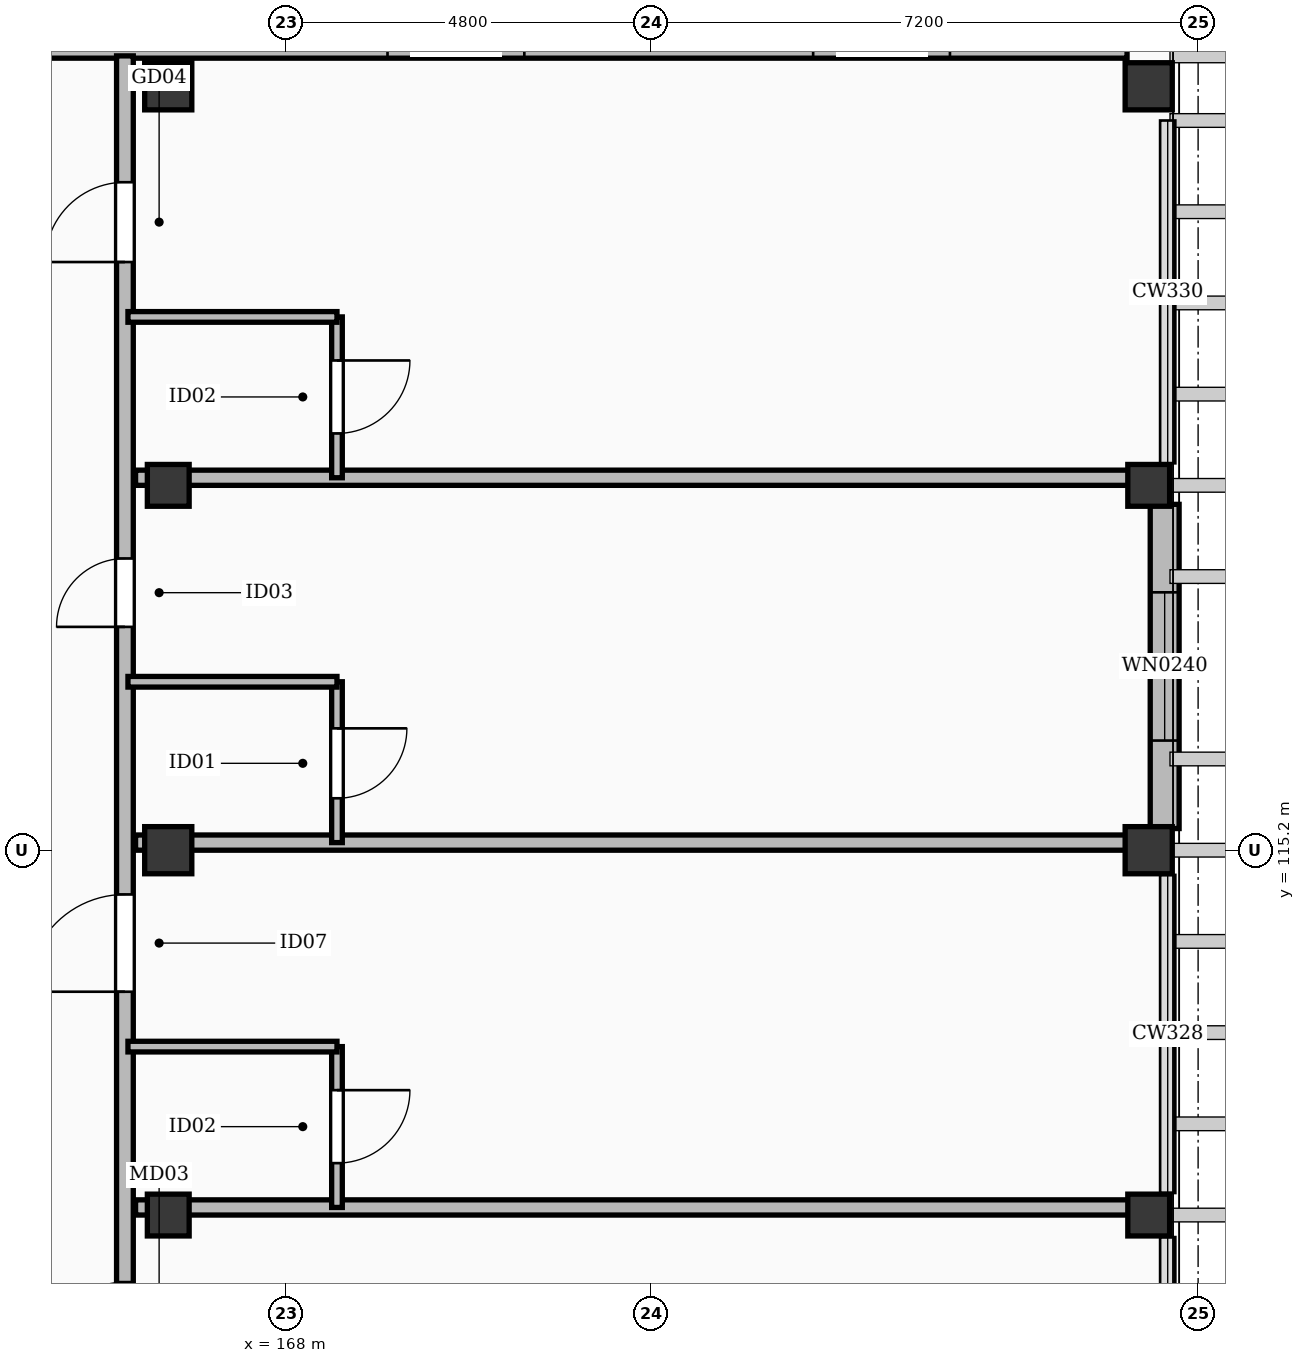
"""IFC4 building model, lengths in metres.
Left out: names, types, materials, properties, quantities, classifications, styles, units other than length and angle.
Written with IfcOpenShell. Run it as: python <this file> out.ifc"""

import sys

from ifc_helpers import new_model, si_unit, direction, frame, frame_2d, origin, origin_2d, place, context, subcontext, project, spatial, rectangle, extrude, element, fill, save


model = new_model("IFC4")
c1 = context("Model", 3, precision=1e-05, world=origin(), true_north=direction((0.0, 1.0)))
c2 = subcontext(c1, "Body", "Model", "MODEL_VIEW")
j1 = project(units=[si_unit("LENGTHUNIT", "METRE"), si_unit("PLANEANGLEUNIT", "RADIAN")], contexts=[c1])
p1 = place(None, origin())
s1 = spatial("IfcSite", under=j1, at=p1, CompositionType="ELEMENT")
p2 = place(p1, origin())
s2 = spatial("IfcBuilding", under=s1, at=p2, CompositionType="ELEMENT")
p3 = place(p2, frame((0.0, 0.0, 42.6)))
s3 = spatial("IfcBuildingStorey", under=s2, at=p3, CompositionType="ELEMENT", Elevation=42.6)
for number, where, z_axis, x_axis in (
    (1, (166.45, 115.2, 0.0), (0.0, 0.0, 1.0), (1.0, 0.0, 0.0)),
    (2, (166.45, 125.25, 0.0), (0.0, 0.0, 1.0), (1.0, 0.0, 0.0)),
    (3, (179.35, 115.2, 0.0), (0.0, 0.0, 1.0), (1.0, 0.0, 0.0)),
    (4, (179.35, 125.25, 0.0), (0.0, 0.0, 1.0), (1.0, 0.0, 0.0)),
):
    element("IfcColumn", number, at=place(p3, frame(where, z_axis=z_axis, x_axis=x_axis)), inside=s3, PredefinedType="COLUMN", context=c2, shape_type="SweptSolid", body=[
        extrude(rectangle(XDim=0.62, YDim=0.62, at=origin_2d()), origin(), (0.0, 0.0, 1.0), 3.9),
    ])
for number, where, z_axis, x_axis in (
    (5, (166.45, 110.4, 0.0), (0.0, 0.0, 1.0), (1.0, 0.0, 0.0)),
    (6, (166.45, 120.0, 0.0), (0.0, 0.0, 1.0), (1.0, 0.0, 0.0)),
    (7, (179.35, 110.4, 0.0), (0.0, 0.0, 1.0), (1.0, 0.0, 0.0)),
    (8, (179.35, 120.0, 0.0), (0.0, 0.0, 1.0), (1.0, 0.0, 0.0)),
):
    element("IfcColumn", number, at=place(p3, frame(where, z_axis=z_axis, x_axis=x_axis)), inside=s3, PredefinedType="COLUMN", context=c2, shape_type="SweptSolid", body=[
        extrude(rectangle(XDim=0.55, YDim=0.55, at=origin_2d()), origin(), (0.0, 0.0, 1.0), 3.9),
    ])
p4 = place(p3, frame((149.735, 125.81, 0.0), z_axis=(0.0, 0.0, 1.0), x_axis=(1.0, 0.0, 0.0)))
e9 = element("IfcWall", 9, at=p4, inside=s3, PredefinedType="SOLIDWALL", context=c2, shape_type="SweptSolid", body=[
    extrude(rectangle(XDim=29.33, YDim=0.38, at=frame_2d((14.665, 0.0))), origin(), (0.0, 0.0, 1.0), 3.66),
])
p5 = place(p4, frame((3.6, 0.0, 0.55)))
e10 = element("IfcOpeningElement", 10, at=p5, cuts=e9, PredefinedType="OPENING", context=c2, shape_type="SweptSolid", body=[
    extrude(rectangle(XDim=1.8, YDim=1.76, at=frame_2d((0.9, 0.88))), frame((0.0, 0.202, 0.0), z_axis=(0.0, -1.0, 0.0), x_axis=(1.0, 0.0, 0.0)), (0.0, 0.0, 1.0), 0.404),
])
p6 = place(p4, frame((9.2, 0.0, 0.55)))
e11 = element("IfcOpeningElement", 11, at=p6, cuts=e9, PredefinedType="OPENING", context=c2, shape_type="SweptSolid", body=[
    extrude(rectangle(XDim=1.8, YDim=1.76, at=frame_2d((0.9, 0.88))), frame((0.0, 0.202, 0.0), z_axis=(0.0, -1.0, 0.0), x_axis=(1.0, 0.0, 0.0)), (0.0, 0.0, 1.0), 0.404),
])
p7 = place(p4, frame((19.6, 0.0, 0.55)))
e12 = element("IfcOpeningElement", 12, at=p7, cuts=e9, PredefinedType="OPENING", context=c2, shape_type="SweptSolid", body=[
    extrude(rectangle(XDim=1.8, YDim=1.76, at=frame_2d((0.9, 0.88))), frame((0.0, 0.202, 0.0), z_axis=(0.0, -1.0, 0.0), x_axis=(1.0, 0.0, 0.0)), (0.0, 0.0, 1.0), 0.404),
])
p8 = place(p4, frame((25.2, 0.0, 0.55)))
e13 = element("IfcOpeningElement", 13, at=p8, cuts=e9, PredefinedType="OPENING", context=c2, shape_type="SweptSolid", body=[
    extrude(rectangle(XDim=1.8, YDim=1.76, at=frame_2d((0.9, 0.88))), frame((0.0, 0.202, 0.0), z_axis=(0.0, -1.0, 0.0), x_axis=(1.0, 0.0, 0.0)), (0.0, 0.0, 1.0), 0.404),
])
p9 = place(p3, frame((179.56, 119.75, 0.0), z_axis=(0.0, 0.0, 1.0), x_axis=(0.0, -1.0, 0.0)))
e14 = element("IfcWall", 14, at=p9, inside=s3, PredefinedType="SOLIDWALL", context=c2, shape_type="SweptSolid", body=[
    extrude(rectangle(XDim=4.265, YDim=0.38, at=frame_2d((2.132, 0.0))), origin(), (0.0, 0.0, 1.0), 2.902),
])
p10 = place(p9, frame((1.157, 0.0, 0.55)))
e15 = element("IfcOpeningElement", 15, at=p10, cuts=e14, PredefinedType="OPENING", context=c2, shape_type="SweptSolid", body=[
    extrude(rectangle(XDim=1.95, YDim=1.77, at=frame_2d((0.975, 0.885))), frame((0.0, 0.202, 0.0), z_axis=(0.0, -1.0, 0.0), x_axis=(1.0, 0.0, 0.0)), (0.0, 0.0, 1.0), 0.404),
])
p11 = place(p3, frame((165.88, 62.75, 0.0), z_axis=(0.0, 0.0, 1.0), x_axis=(0.0, 1.0, 0.0)))
e16 = element("IfcWall", 16, at=p11, inside=s3, PredefinedType="PARTITIONING", context=c2, shape_type="SweptSolid", body=[
    extrude(rectangle(XDim=62.9, YDim=0.22, at=frame_2d((31.45, 0.0))), origin(), (0.0, 0.0, 1.0), 2.902),
])
p12 = place(p11, frame((0.691, 0.0, 0.0)))
e17 = element("IfcOpeningElement", 17, at=p12, cuts=e16, PredefinedType="OPENING", context=c2, shape_type="SweptSolid", body=[
    extrude(rectangle(XDim=1.05, YDim=2.22, at=frame_2d((0.525, 1.11))), frame((0.0, 0.122, 0.0), z_axis=(0.0, -1.0, 0.0), x_axis=(1.0, 0.0, 0.0)), (0.0, 0.0, 1.0), 0.244),
])
p13 = place(p11, frame((7.388, 0.0, 0.0)))
e18 = element("IfcOpeningElement", 18, at=p13, cuts=e16, PredefinedType="OPENING", context=c2, shape_type="SweptSolid", body=[
    extrude(rectangle(XDim=1.02, YDim=2.2, at=frame_2d((0.51, 1.1))), frame((0.0, 0.122, 0.0), z_axis=(0.0, -1.0, 0.0), x_axis=(1.0, 0.0, 0.0)), (0.0, 0.0, 1.0), 0.244),
])
p14 = place(p11, frame((12.188, 0.0, 0.0)))
e19 = element("IfcOpeningElement", 19, at=p14, cuts=e16, PredefinedType="OPENING", context=c2, shape_type="SweptSolid", body=[
    extrude(rectangle(XDim=1.14, YDim=2.26, at=frame_2d((0.57, 1.13))), frame((0.0, 0.122, 0.0), z_axis=(0.0, -1.0, 0.0), x_axis=(1.0, 0.0, 0.0)), (0.0, 0.0, 1.0), 0.244),
])
p15 = place(p11, frame((16.988, 0.0, 0.0)))
e20 = element("IfcOpeningElement", 20, at=p15, cuts=e16, PredefinedType="OPENING", context=c2, shape_type="SweptSolid", body=[
    extrude(rectangle(XDim=0.98, YDim=2.15, at=frame_2d((0.49, 1.075))), frame((0.0, 0.122, 0.0), z_axis=(0.0, -1.0, 0.0), x_axis=(1.0, 0.0, 0.0)), (0.0, 0.0, 1.0), 0.244),
])
p16 = place(p11, frame((21.788, 0.0, 0.0)))
e21 = element("IfcOpeningElement", 21, at=p16, cuts=e16, PredefinedType="OPENING", context=c2, shape_type="SweptSolid", body=[
    extrude(rectangle(XDim=1.28, YDim=2.16, at=frame_2d((0.64, 1.08))), frame((0.0, 0.122, 0.0), z_axis=(0.0, -1.0, 0.0), x_axis=(1.0, 0.0, 0.0)), (0.0, 0.0, 1.0), 0.244),
])
p17 = place(p11, frame((26.588, 0.0, 0.0)))
e22 = element("IfcOpeningElement", 22, at=p17, cuts=e16, PredefinedType="OPENING", context=c2, shape_type="SweptSolid", body=[
    extrude(rectangle(XDim=0.9, YDim=2.08, at=frame_2d((0.45, 1.04))), frame((0.0, 0.122, 0.0), z_axis=(0.0, -1.0, 0.0), x_axis=(1.0, 0.0, 0.0)), (0.0, 0.0, 1.0), 0.244),
])
p18 = place(p11, frame((31.388, 0.0, 0.0)))
e23 = element("IfcOpeningElement", 23, at=p18, cuts=e16, PredefinedType="OPENING", context=c2, shape_type="SweptSolid", body=[
    extrude(rectangle(XDim=1.05, YDim=2.22, at=frame_2d((0.525, 1.11))), frame((0.0, 0.122, 0.0), z_axis=(0.0, -1.0, 0.0), x_axis=(1.0, 0.0, 0.0)), (0.0, 0.0, 1.0), 0.244),
])
p19 = place(p11, frame((36.188, 0.0, 0.0)))
e24 = element("IfcOpeningElement", 24, at=p19, cuts=e16, PredefinedType="OPENING", context=c2, shape_type="SweptSolid", body=[
    extrude(rectangle(XDim=1.02, YDim=2.2, at=frame_2d((0.51, 1.1))), frame((0.0, 0.122, 0.0), z_axis=(0.0, -1.0, 0.0), x_axis=(1.0, 0.0, 0.0)), (0.0, 0.0, 1.0), 0.244),
])
p20 = place(p11, frame((40.988, 0.0, 0.0)))
e25 = element("IfcOpeningElement", 25, at=p20, cuts=e16, PredefinedType="OPENING", context=c2, shape_type="SweptSolid", body=[
    extrude(rectangle(XDim=1.14, YDim=2.26, at=frame_2d((0.57, 1.13))), frame((0.0, 0.122, 0.0), z_axis=(0.0, -1.0, 0.0), x_axis=(1.0, 0.0, 0.0)), (0.0, 0.0, 1.0), 0.244),
])
p21 = place(p11, frame((45.788, 0.0, 0.0)))
e26 = element("IfcOpeningElement", 26, at=p21, cuts=e16, PredefinedType="OPENING", context=c2, shape_type="SweptSolid", body=[
    extrude(rectangle(XDim=0.98, YDim=2.15, at=frame_2d((0.49, 1.075))), frame((0.0, 0.122, 0.0), z_axis=(0.0, -1.0, 0.0), x_axis=(1.0, 0.0, 0.0)), (0.0, 0.0, 1.0), 0.244),
])
p22 = place(p11, frame((50.588, 0.0, 0.0)))
e27 = element("IfcOpeningElement", 27, at=p22, cuts=e16, PredefinedType="OPENING", context=c2, shape_type="SweptSolid", body=[
    extrude(rectangle(XDim=1.28, YDim=2.16, at=frame_2d((0.64, 1.08))), frame((0.0, 0.122, 0.0), z_axis=(0.0, -1.0, 0.0), x_axis=(1.0, 0.0, 0.0)), (0.0, 0.0, 1.0), 0.244),
])
p23 = place(p11, frame((55.388, 0.0, 0.0)))
e28 = element("IfcOpeningElement", 28, at=p23, cuts=e16, PredefinedType="OPENING", context=c2, shape_type="SweptSolid", body=[
    extrude(rectangle(XDim=0.9, YDim=2.08, at=frame_2d((0.45, 1.04))), frame((0.0, 0.122, 0.0), z_axis=(0.0, -1.0, 0.0), x_axis=(1.0, 0.0, 0.0)), (0.0, 0.0, 1.0), 0.244),
])
p24 = place(p11, frame((60.188, 0.0, 0.0)))
e29 = element("IfcOpeningElement", 29, at=p24, cuts=e16, PredefinedType="OPENING", context=c2, shape_type="SweptSolid", body=[
    extrude(rectangle(XDim=1.05, YDim=2.22, at=frame_2d((0.525, 1.11))), frame((0.0, 0.122, 0.0), z_axis=(0.0, -1.0, 0.0), x_axis=(1.0, 0.0, 0.0)), (0.0, 0.0, 1.0), 0.244),
])
p25 = place(p3, frame((166.02, 110.5, 0.0), z_axis=(0.0, 0.0, 1.0), x_axis=(1.0, 0.0, 0.0)))
e30 = element("IfcWall", 30, at=p25, inside=s3, PredefinedType="PARTITIONING", context=c2, shape_type="SweptSolid", body=[
    extrude(rectangle(XDim=13.23, YDim=0.2, at=frame_2d((6.615, 0.0))), origin(), (0.0, 0.0, 1.0), 2.902),
])
p26 = place(p3, frame((168.67, 110.5, 0.0), z_axis=(0.0, 0.0, 1.0), x_axis=(0.0, 1.0, 0.0)))
e31 = element("IfcWall", 31, at=p26, inside=s3, PredefinedType="PARTITIONING", context=c2, shape_type="SweptSolid", body=[
    extrude(rectangle(XDim=2.116, YDim=0.14, at=frame_2d((1.058, 0.0))), origin(), (0.0, 0.0, 1.0), 3.072),
])
p27 = place(p26, frame((0.583, 0.0, 0.0)))
e32 = element("IfcOpeningElement", 32, at=p27, cuts=e31, PredefinedType="OPENING", context=c2, shape_type="SweptSolid", body=[
    extrude(rectangle(XDim=0.96, YDim=2.12, at=frame_2d((0.48, 1.06))), frame((0.0, 0.082, 0.0), z_axis=(0.0, -1.0, 0.0), x_axis=(1.0, 0.0, 0.0)), (0.0, 0.0, 1.0), 0.164),
])
p28 = place(p3, frame((165.92, 112.616, 0.0), z_axis=(0.0, 0.0, 1.0), x_axis=(1.0, 0.0, 0.0)))
e33 = element("IfcWall", 33, at=p28, inside=s3, PredefinedType="PARTITIONING", context=c2, shape_type="SweptSolid", body=[
    extrude(rectangle(XDim=2.75, YDim=0.14, at=frame_2d((1.375, 0.0))), origin(), (0.0, 0.0, 1.0), 3.072),
])
p29 = place(p3, frame((166.02, 115.3, 0.0), z_axis=(0.0, 0.0, 1.0), x_axis=(1.0, 0.0, 0.0)))
e34 = element("IfcWall", 34, at=p29, inside=s3, PredefinedType="PARTITIONING", context=c2, shape_type="SweptSolid", body=[
    extrude(rectangle(XDim=13.23, YDim=0.2, at=frame_2d((6.615, 0.0))), origin(), (0.0, 0.0, 1.0), 2.902),
])
p30 = place(p3, frame((168.67, 115.3, 0.0), z_axis=(0.0, 0.0, 1.0), x_axis=(0.0, 1.0, 0.0)))
e35 = element("IfcWall", 35, at=p30, inside=s3, PredefinedType="PARTITIONING", context=c2, shape_type="SweptSolid", body=[
    extrude(rectangle(XDim=2.116, YDim=0.14, at=frame_2d((1.058, 0.0))), origin(), (0.0, 0.0, 1.0), 3.072),
])
p31 = place(p30, frame((0.583, 0.0, 0.0)))
e36 = element("IfcOpeningElement", 36, at=p31, cuts=e35, PredefinedType="OPENING", context=c2, shape_type="SweptSolid", body=[
    extrude(rectangle(XDim=0.92, YDim=2.1, at=frame_2d((0.46, 1.05))), frame((0.0, 0.082, 0.0), z_axis=(0.0, -1.0, 0.0), x_axis=(1.0, 0.0, 0.0)), (0.0, 0.0, 1.0), 0.164),
])
p32 = place(p3, frame((165.92, 117.416, 0.0), z_axis=(0.0, 0.0, 1.0), x_axis=(1.0, 0.0, 0.0)))
e37 = element("IfcWall", 37, at=p32, inside=s3, PredefinedType="PARTITIONING", context=c2, shape_type="SweptSolid", body=[
    extrude(rectangle(XDim=2.75, YDim=0.14, at=frame_2d((1.375, 0.0))), origin(), (0.0, 0.0, 1.0), 3.072),
])
p33 = place(p3, frame((166.02, 120.1, 0.0), z_axis=(0.0, 0.0, 1.0), x_axis=(1.0, 0.0, 0.0)))
e38 = element("IfcWall", 38, at=p33, inside=s3, PredefinedType="PARTITIONING", context=c2, shape_type="SweptSolid", body=[
    extrude(rectangle(XDim=13.23, YDim=0.2, at=frame_2d((6.615, 0.0))), origin(), (0.0, 0.0, 1.0), 2.902),
])
p34 = place(p3, frame((168.67, 120.1, 0.0), z_axis=(0.0, 0.0, 1.0), x_axis=(0.0, 1.0, 0.0)))
e39 = element("IfcWall", 39, at=p34, inside=s3, PredefinedType="PARTITIONING", context=c2, shape_type="SweptSolid", body=[
    extrude(rectangle(XDim=2.116, YDim=0.14, at=frame_2d((1.058, 0.0))), origin(), (0.0, 0.0, 1.0), 3.072),
])
p35 = place(p34, frame((0.583, 0.0, 0.0)))
e40 = element("IfcOpeningElement", 40, at=p35, cuts=e39, PredefinedType="OPENING", context=c2, shape_type="SweptSolid", body=[
    extrude(rectangle(XDim=0.96, YDim=2.12, at=frame_2d((0.48, 1.06))), frame((0.0, 0.082, 0.0), z_axis=(0.0, -1.0, 0.0), x_axis=(1.0, 0.0, 0.0)), (0.0, 0.0, 1.0), 0.164),
])
p36 = place(p3, frame((165.92, 122.216, 0.0), z_axis=(0.0, 0.0, 1.0), x_axis=(1.0, 0.0, 0.0)))
e41 = element("IfcWall", 41, at=p36, inside=s3, PredefinedType="PARTITIONING", context=c2, shape_type="SweptSolid", body=[
    extrude(rectangle(XDim=2.75, YDim=0.14, at=frame_2d((1.375, 0.0))), origin(), (0.0, 0.0, 1.0), 3.072),
])
p37 = place(p10, origin())
e42 = element("IfcWindow", 42, at=p37, inside=s3, PartitioningType="SINGLE_PANEL", PredefinedType="WINDOW", context=c2, shape_type="SweptSolid", body=[
    extrude(rectangle(XDim=1.95, YDim=1.77, at=frame_2d((0.975, 0.885))), frame((0.0, 0.03, 0.0), z_axis=(0.0, -1.0, 0.0), x_axis=(1.0, 0.0, 0.0)), (0.0, 0.0, 1.0), 0.06),
])
fill(e15, e42)
p38 = place(p21, origin())
e43 = element("IfcDoor", 43, at=p38, inside=s3, OperationType="SINGLE_SWING_LEFT", PredefinedType="DOOR", context=c2, shape_type="SweptSolid", body=[
    extrude(rectangle(XDim=0.98, YDim=2.15, at=frame_2d((0.49, 1.075))), frame((0.0, 0.025, 0.0), z_axis=(0.0, -1.0, 0.0), x_axis=(1.0, 0.0, 0.0)), (0.0, 0.0, 1.0), 0.05),
])
fill(e26, e43)
p39 = place(p22, origin())
e44 = element("IfcDoor", 44, at=p39, inside=s3, OperationType="SINGLE_SWING_LEFT", PredefinedType="DOOR", context=c2, shape_type="SweptSolid", body=[
    extrude(rectangle(XDim=1.28, YDim=2.16, at=frame_2d((0.64, 1.08))), frame((0.0, 0.025, 0.0), z_axis=(0.0, -1.0, 0.0), x_axis=(1.0, 0.0, 0.0)), (0.0, 0.0, 1.0), 0.05),
])
fill(e27, e44)
p40 = place(p27, frame((0.96, 0.0, 0.0), z_axis=(0.0, 0.0, 1.0), x_axis=(-1.0, 0.0, 0.0)))
e45 = element("IfcDoor", 45, at=p40, inside=s3, OperationType="SINGLE_SWING_RIGHT", PredefinedType="DOOR", context=c2, shape_type="SweptSolid", body=[
    extrude(rectangle(XDim=0.96, YDim=2.12, at=frame_2d((0.48, 1.06))), frame((0.0, 0.025, 0.0), z_axis=(0.0, -1.0, 0.0), x_axis=(1.0, 0.0, 0.0)), (0.0, 0.0, 1.0), 0.05),
])
fill(e32, e45)
p41 = place(p23, origin())
e46 = element("IfcDoor", 46, at=p41, inside=s3, OperationType="SINGLE_SWING_LEFT", PredefinedType="DOOR", context=c2, shape_type="SweptSolid", body=[
    extrude(rectangle(XDim=0.9, YDim=2.08, at=frame_2d((0.45, 1.04))), frame((0.0, 0.025, 0.0), z_axis=(0.0, -1.0, 0.0), x_axis=(1.0, 0.0, 0.0)), (0.0, 0.0, 1.0), 0.05),
])
fill(e28, e46)
p42 = place(p31, frame((0.92, 0.0, 0.0), z_axis=(0.0, 0.0, 1.0), x_axis=(-1.0, 0.0, 0.0)))
e47 = element("IfcDoor", 47, at=p42, inside=s3, OperationType="SINGLE_SWING_RIGHT", PredefinedType="DOOR", context=c2, shape_type="SweptSolid", body=[
    extrude(rectangle(XDim=0.92, YDim=2.1, at=frame_2d((0.46, 1.05))), frame((0.0, 0.025, 0.0), z_axis=(0.0, -1.0, 0.0), x_axis=(1.0, 0.0, 0.0)), (0.0, 0.0, 1.0), 0.05),
])
fill(e36, e47)
p43 = place(p24, origin())
e48 = element("IfcDoor", 48, at=p43, inside=s3, OperationType="SINGLE_SWING_LEFT", PredefinedType="DOOR", context=c2, shape_type="SweptSolid", body=[
    extrude(rectangle(XDim=1.05, YDim=2.22, at=frame_2d((0.525, 1.11))), frame((0.0, 0.025, 0.0), z_axis=(0.0, -1.0, 0.0), x_axis=(1.0, 0.0, 0.0)), (0.0, 0.0, 1.0), 0.05),
])
fill(e29, e48)
p44 = place(p35, frame((0.96, 0.0, 0.0), z_axis=(0.0, 0.0, 1.0), x_axis=(-1.0, 0.0, 0.0)))
e49 = element("IfcDoor", 49, at=p44, inside=s3, OperationType="SINGLE_SWING_RIGHT", PredefinedType="DOOR", context=c2, shape_type="SweptSolid", body=[
    extrude(rectangle(XDim=0.96, YDim=2.12, at=frame_2d((0.48, 1.06))), frame((0.0, 0.025, 0.0), z_axis=(0.0, -1.0, 0.0), x_axis=(1.0, 0.0, 0.0)), (0.0, 0.0, 1.0), 0.05),
])
fill(e40, e49)
save(model, sys.argv[1])
